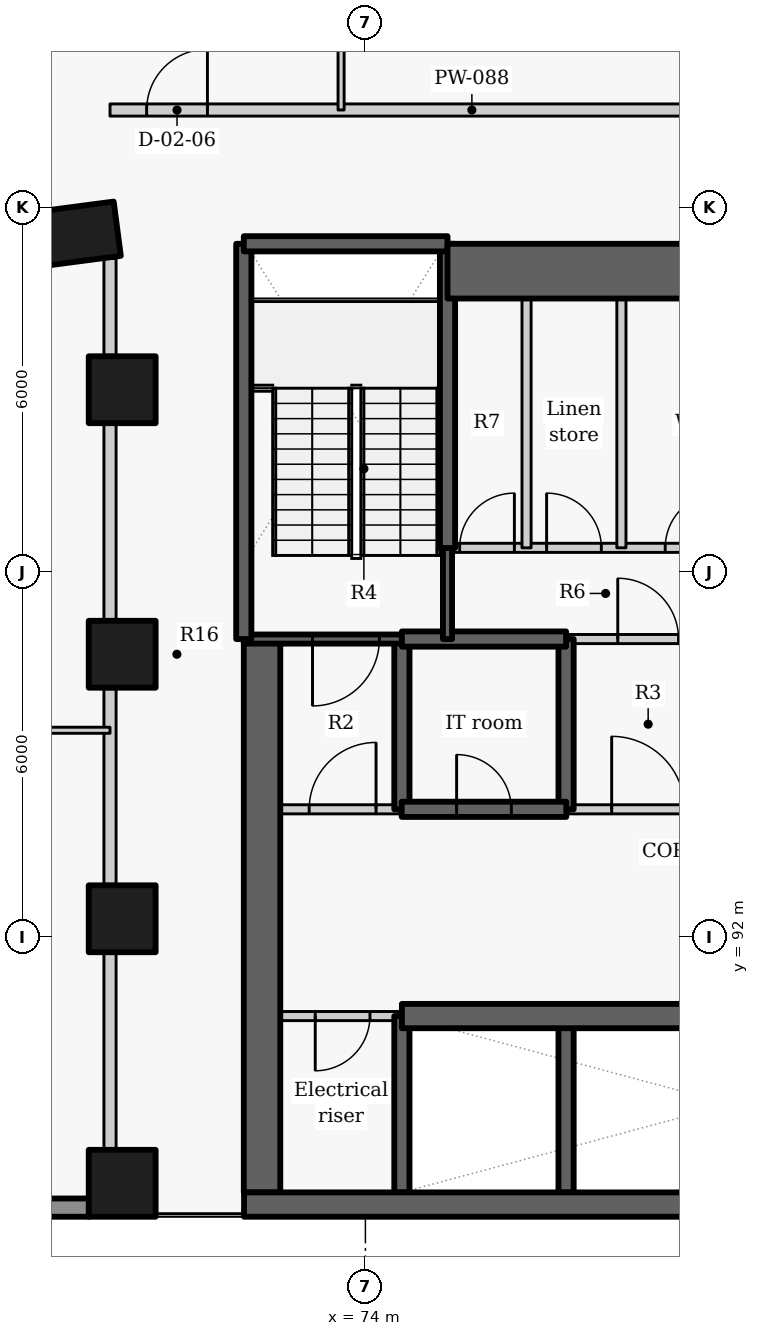
"""IFC4 building model, lengths in metres.
Left out: names, types, materials, properties, quantities, classifications, styles, units other than length and angle.
Written with IfcOpenShell. Run it as: python <this file> out.ifc"""

import sys

from ifc_helpers import new_model, si_unit, direction, frame, frame_2d, origin, origin_2d, place, context, subcontext, project, spatial, rectangle, extrude, element, fill, save


model = new_model("IFC4")
c1 = context("Model", 3, precision=1e-05, world=origin(), true_north=direction((0.0, 1.0)))
c2 = subcontext(c1, "Body", "Model", "MODEL_VIEW")
j1 = project(units=[si_unit("LENGTHUNIT", "METRE"), si_unit("PLANEANGLEUNIT", "RADIAN")], contexts=[c1])
p1 = place(None, origin())
s1 = spatial("IfcSite", under=j1, at=p1, CompositionType="ELEMENT")
p2 = place(p1, origin())
s2 = spatial("IfcBuilding", under=s1, at=p2, CompositionType="ELEMENT")
p3 = place(p2, frame((0.0, 0.0, 24.0)))
s3 = spatial("IfcBuildingStorey", under=s2, at=p3, CompositionType="ELEMENT", Elevation=24.0)
p4 = place(p3, frame((69.175, 103.55, 0.0), z_axis=(0.0, 0.0, 1.0), x_axis=(-0.991442583111, -0.130543496177, 0.0)))
e1 = element("IfcColumn", 1, at=p4, inside=s3, PredefinedType="COLUMN", context=c2, shape_type="SweptSolid", body=[
    extrude(rectangle(XDim=1.5, YDim=0.9, at=origin_2d()), origin(), (0.0, 0.0, 1.0), 4.2),
])
for number, where, z_axis, x_axis in (
    (2, (70.0, 101.0, 0.0), (0.0, 0.0, 1.0), (0.0, -1.0, 0.0)),
    (3, (70.0, 96.65, 0.0), (0.0, 0.0, 1.0), (0.0, -1.0, 0.0)),
    (4, (70.0, 92.3, 0.0), (0.0, 0.0, 1.0), (0.0, -1.0, 0.0)),
    (5, (70.0, 87.95, 0.0), (0.0, 0.0, 1.0), (0.0, -1.0, 0.0)),
):
    element("IfcColumn", number, at=place(p3, frame(where, z_axis=z_axis, x_axis=x_axis)), inside=s3, PredefinedType="COLUMN", context=c2, shape_type="SweptSolid", body=[
        extrude(rectangle(XDim=1.1, YDim=1.1, at=origin_2d()), origin(), (0.0, 0.0, 1.0), 4.2),
    ])
p5 = place(p3, frame((63.438, 87.55, 0.0), z_axis=(0.0, 0.0, 1.0), x_axis=(1.0, 0.0, 0.0)))
e6 = element("IfcWall", 6, at=p5, inside=s3, PredefinedType="SOLIDWALL", context=c2, shape_type="SweptSolid", body=[
    extrude(rectangle(XDim=6.016, YDim=0.3, at=frame_2d((3.008, 0.0))), origin(), (0.0, 0.0, 1.0), 3.325),
])
p6 = place(p5, frame((1.958, 0.0, 0.9)))
e7 = element("IfcOpeningElement", 7, at=p6, cuts=e6, PredefinedType="OPENING", context=c2, shape_type="SweptSolid", body=[
    extrude(rectangle(XDim=2.1, YDim=2.05, at=frame_2d((1.05, 1.025))), frame((0.0, 0.16, 0.0), z_axis=(0.0, -1.0, 0.0), x_axis=(1.0, 0.0, 0.0)), (0.0, 0.0, 1.0), 0.32),
])
p7 = place(p3, frame((74.6, 87.8, -0.3), z_axis=(0.0, 0.0, 1.0), x_axis=(0.0, 1.0, 0.0)))
e8 = element("IfcWall", 8, at=p7, inside=s3, PredefinedType="SHEAR", context=c2, shape_type="SweptSolid", body=[
    extrude(rectangle(XDim=2.9, YDim=0.25, at=frame_2d((1.45, 0.0))), origin(), (0.0, 0.0, 1.0), 4.225),
])
p8 = place(p3, frame((74.6, 94.1, -0.3), z_axis=(0.0, 0.0, 1.0), x_axis=(0.0, 1.0, 0.0)))
e9 = element("IfcWall", 9, at=p8, inside=s3, PredefinedType="SHEAR", context=c2, shape_type="SweptSolid", body=[
    extrude(rectangle(XDim=2.8, YDim=0.25, at=frame_2d((1.4, 0.0))), origin(), (0.0, 0.0, 1.0), 4.225),
])
p9 = place(p3, frame((74.6, 90.7, 0.0), z_axis=(0.0, 0.0, 1.0), x_axis=(-1.0, 0.0, 0.0)))
e10 = element("IfcWall", 10, at=p9, inside=s3, PredefinedType="PARTITIONING", context=c2, shape_type="SweptSolid", body=[
    extrude(rectangle(XDim=2.6, YDim=0.15, at=frame_2d((1.3, 0.0))), origin(), (0.0, 0.0, 1.0), 3.925),
])
p10 = place(p9, frame((0.525, 0.0, 0.0)))
e11 = element("IfcOpeningElement", 11, at=p10, cuts=e10, PredefinedType="OPENING", context=c2, shape_type="SweptSolid", body=[
    extrude(rectangle(XDim=0.9, YDim=2.1, at=frame_2d((0.45, 1.05))), frame((0.0, 0.085, 0.0), z_axis=(0.0, -1.0, 0.0), x_axis=(1.0, 0.0, 0.0)), (0.0, 0.0, 1.0), 0.17),
])
p11 = place(p3, frame((72.3, 87.8, -0.3), z_axis=(0.0, 0.0, 1.0), x_axis=(0.0, 1.0, 0.0)))
e12 = element("IfcWall", 12, at=p11, inside=s3, PredefinedType="SHEAR", context=c2, shape_type="SweptSolid", body=[
    extrude(rectangle(XDim=9.1, YDim=0.6, at=frame_2d((4.55, 0.0))), origin(), (0.0, 0.0, 1.0), 4.225),
])
p12 = place(p3, frame((77.3, 87.8, -0.3), z_axis=(0.0, 0.0, 1.0), x_axis=(0.0, 1.0, 0.0)))
e13 = element("IfcWall", 13, at=p12, inside=s3, PredefinedType="SHEAR", context=c2, shape_type="SweptSolid", body=[
    extrude(rectangle(XDim=2.9, YDim=0.25, at=frame_2d((1.45, 0.0))), origin(), (0.0, 0.0, 1.0), 4.225),
])
p13 = place(p3, frame((77.3, 94.1, -0.3), z_axis=(0.0, 0.0, 1.0), x_axis=(0.0, 1.0, 0.0)))
e14 = element("IfcWall", 14, at=p13, inside=s3, PredefinedType="SHEAR", context=c2, shape_type="SweptSolid", body=[
    extrude(rectangle(XDim=2.8, YDim=0.25, at=frame_2d((1.4, 0.0))), origin(), (0.0, 0.0, 1.0), 4.225),
])
p14 = place(p3, frame((74.6, 90.7, -0.3), z_axis=(0.0, 0.0, 1.0), x_axis=(1.0, 0.0, 0.0)))
e15 = element("IfcWall", 15, at=p14, inside=s3, PredefinedType="SHEAR", context=c2, shape_type="SweptSolid", body=[
    extrude(rectangle(XDim=10.8, YDim=0.4, at=frame_2d((5.4, 0.0))), origin(), (0.0, 0.0, 1.0), 4.225),
])
p15 = place(p3, frame((72.0, 94.1, 0.0), z_axis=(0.0, 0.0, 1.0), x_axis=(1.0, 0.0, 0.0)))
e16 = element("IfcWall", 16, at=p15, inside=s3, PredefinedType="PARTITIONING", context=c2, shape_type="SweptSolid", body=[
    extrude(rectangle(XDim=2.603, YDim=0.15, at=frame_2d((1.302, 0.0))), origin(), (0.0, 0.0, 1.0), 3.925),
])
p16 = place(p15, frame((1.075, 0.0, 0.0)))
e17 = element("IfcOpeningElement", 17, at=p16, cuts=e16, PredefinedType="OPENING", context=c2, shape_type="SweptSolid", body=[
    extrude(rectangle(XDim=1.1, YDim=2.1, at=frame_2d((0.55, 1.05))), frame((0.0, 0.085, 0.0), z_axis=(0.0, -1.0, 0.0), x_axis=(1.0, 0.0, 0.0)), (0.0, 0.0, 1.0), 0.17),
])
p17 = place(p3, frame((77.297, 94.1, 0.0), z_axis=(0.0, 0.0, 1.0), x_axis=(1.0, 0.0, 0.0)))
e18 = element("IfcWall", 18, at=p17, inside=s3, PredefinedType="PARTITIONING", context=c2, shape_type="SweptSolid", body=[
    extrude(rectangle(XDim=2.706, YDim=0.15, at=frame_2d((1.353, 0.0))), origin(), (0.0, 0.0, 1.0), 3.925),
])
p18 = place(p17, frame((0.753, 0.0, 0.0)))
e19 = element("IfcOpeningElement", 19, at=p18, cuts=e18, PredefinedType="OPENING", context=c2, shape_type="SweptSolid", body=[
    extrude(rectangle(XDim=1.2, YDim=2.1, at=frame_2d((0.6, 1.05))), frame((0.0, 0.085, 0.0), z_axis=(0.0, -1.0, 0.0), x_axis=(1.0, 0.0, 0.0)), (0.0, 0.0, 1.0), 0.17),
])
p19 = place(p3, frame((74.597, 94.1, -0.3), z_axis=(0.0, 0.0, 1.0), x_axis=(1.0, 0.0, 0.0)))
e20 = element("IfcWall", 20, at=p19, inside=s3, PredefinedType="SHEAR", context=c2, shape_type="SweptSolid", body=[
    extrude(rectangle(XDim=2.706, YDim=0.25, at=frame_2d((1.353, 0.0))), origin(), (0.0, 0.0, 1.0), 4.225),
])
p20 = place(p19, frame((0.903, 0.0, 0.3)))
e21 = element("IfcOpeningElement", 21, at=p20, cuts=e20, PredefinedType="OPENING", context=c2, shape_type="SweptSolid", body=[
    extrude(rectangle(XDim=0.9, YDim=2.1, at=frame_2d((0.45, 1.05))), frame((0.0, 0.135, 0.0), z_axis=(0.0, -1.0, 0.0), x_axis=(1.0, 0.0, 0.0)), (0.0, 0.0, 1.0), 0.27),
])
p21 = place(p3, frame((74.6, 96.9, -0.3), z_axis=(0.0, 0.0, 1.0), x_axis=(-1.0, 0.0, 0.0)))
e22 = element("IfcWall", 22, at=p21, inside=s3, PredefinedType="SHEAR", context=c2, shape_type="SweptSolid", body=[
    extrude(rectangle(XDim=2.6, YDim=0.15, at=frame_2d((1.3, 0.0))), origin(), (0.0, 0.0, 1.0), 4.225),
])
p22 = place(p21, frame((0.37, 0.0, 0.3)))
e23 = element("IfcOpeningElement", 23, at=p22, cuts=e22, PredefinedType="OPENING", context=c2, shape_type="SweptSolid", body=[
    extrude(rectangle(XDim=1.1, YDim=2.1, at=frame_2d((0.55, 1.05))), frame((0.0, 0.085, 0.0), z_axis=(0.0, -1.0, 0.0), x_axis=(1.0, 0.0, 0.0)), (0.0, 0.0, 1.0), 0.17),
])
p23 = place(p3, frame((74.6, 96.9, -0.3), z_axis=(0.0, 0.0, 1.0), x_axis=(1.0, 0.0, 0.0)))
e24 = element("IfcWall", 24, at=p23, inside=s3, PredefinedType="SHEAR", context=c2, shape_type="SweptSolid", body=[
    extrude(rectangle(XDim=2.7, YDim=0.25, at=frame_2d((1.35, 0.0))), origin(), (0.0, 0.0, 1.0), 4.225),
])
p24 = place(p3, frame((77.3, 96.9, 0.0), z_axis=(0.0, 0.0, 1.0), x_axis=(1.0, 0.0, 0.0)))
e25 = element("IfcWall", 25, at=p24, inside=s3, PredefinedType="PARTITIONING", context=c2, shape_type="SweptSolid", body=[
    extrude(rectangle(XDim=2.7, YDim=0.15, at=frame_2d((1.35, 0.0))), origin(), (0.0, 0.0, 1.0), 3.925),
])
p25 = place(p24, frame((0.85, 0.0, 0.0)))
e26 = element("IfcOpeningElement", 26, at=p25, cuts=e25, PredefinedType="OPENING", context=c2, shape_type="SweptSolid", body=[
    extrude(rectangle(XDim=1.0, YDim=2.1, at=frame_2d((0.5, 1.05))), frame((0.0, 0.085, 0.0), z_axis=(0.0, -1.0, 0.0), x_axis=(1.0, 0.0, 0.0)), (0.0, 0.0, 1.0), 0.17),
])
p26 = place(p3, frame((75.35, 96.9, -0.3), z_axis=(0.0, 0.0, 1.0), x_axis=(0.0, 1.0, 0.0)))
e27 = element("IfcWall", 27, at=p26, inside=s3, PredefinedType="SHEAR", context=c2, shape_type="SweptSolid", body=[
    extrude(rectangle(XDim=1.503, YDim=0.15, at=frame_2d((0.751, 0.0))), origin(), (0.0, 0.0, 1.0), 4.225),
])
p27 = place(p3, frame((75.35, 98.397, -0.3), z_axis=(0.0, 0.0, 1.0), x_axis=(0.0, 1.0, 0.0)))
e28 = element("IfcWall", 28, at=p27, inside=s3, PredefinedType="SHEAR", context=c2, shape_type="SweptSolid", body=[
    extrude(rectangle(XDim=5.003, YDim=0.25, at=frame_2d((2.501, 0.0))), origin(), (0.0, 0.0, 1.0), 4.225),
])
p28 = place(p3, frame((72.0, 96.9, -0.3), z_axis=(0.0, 0.0, 1.0), x_axis=(0.0, 1.0, 0.0)))
e29 = element("IfcWall", 29, at=p28, inside=s3, PredefinedType="SHEAR", context=c2, shape_type="SweptSolid", body=[
    extrude(rectangle(XDim=6.5, YDim=0.25, at=frame_2d((3.25, 0.0))), origin(), (0.0, 0.0, 1.0), 4.225),
])
p29 = place(p3, frame((72.0, 103.4, -0.3), z_axis=(0.0, 0.0, 1.0), x_axis=(1.0, 0.0, 0.0)))
e30 = element("IfcWall", 30, at=p29, inside=s3, PredefinedType="SHEAR", context=c2, shape_type="SweptSolid", body=[
    extrude(rectangle(XDim=3.35, YDim=0.25, at=frame_2d((1.675, 0.0))), origin(), (0.0, 0.0, 1.0), 4.225),
])
p30 = place(p3, frame((75.35, 102.95, -0.3), z_axis=(0.0, 0.0, 1.0), x_axis=(1.0, 0.0, 0.0)))
e31 = element("IfcWall", 31, at=p30, inside=s3, PredefinedType="SHEAR", context=c2, shape_type="SweptSolid", body=[
    extrude(rectangle(XDim=5.2, YDim=0.9, at=frame_2d((2.6, 0.0))), origin(), (0.0, 0.0, 1.0), 4.225),
])
p31 = place(p3, frame((75.35, 98.4, 0.0), z_axis=(0.0, 0.0, 1.0), x_axis=(1.0, 0.0, 0.0)))
e32 = element("IfcWall", 32, at=p31, inside=s3, PredefinedType="PARTITIONING", context=c2, shape_type="SweptSolid", body=[
    extrude(rectangle(XDim=5.2, YDim=0.15, at=frame_2d((2.6, 0.0))), origin(), (0.0, 0.0, 1.0), 3.925),
])
p32 = place(p31, frame((0.2, 0.0, 0.0)))
e33 = element("IfcOpeningElement", 33, at=p32, cuts=e32, PredefinedType="OPENING", context=c2, shape_type="SweptSolid", body=[
    extrude(rectangle(XDim=0.9, YDim=2.1, at=frame_2d((0.45, 1.05))), frame((0.0, 0.085, 0.0), z_axis=(0.0, -1.0, 0.0), x_axis=(1.0, 0.0, 0.0)), (0.0, 0.0, 1.0), 0.17),
])
p33 = place(p31, frame((1.63, 0.0, 0.0)))
e34 = element("IfcOpeningElement", 34, at=p33, cuts=e32, PredefinedType="OPENING", context=c2, shape_type="SweptSolid", body=[
    extrude(rectangle(XDim=0.9, YDim=2.1, at=frame_2d((0.45, 1.05))), frame((0.0, 0.085, 0.0), z_axis=(0.0, -1.0, 0.0), x_axis=(1.0, 0.0, 0.0)), (0.0, 0.0, 1.0), 0.17),
])
p34 = place(p31, frame((3.58, 0.0, 0.0)))
e35 = element("IfcOpeningElement", 35, at=p34, cuts=e32, PredefinedType="OPENING", context=c2, shape_type="SweptSolid", body=[
    extrude(rectangle(XDim=0.9, YDim=2.1, at=frame_2d((0.45, 1.05))), frame((0.0, 0.085, 0.0), z_axis=(0.0, -1.0, 0.0), x_axis=(1.0, 0.0, 0.0)), (0.0, 0.0, 1.0), 0.17),
])
for number, where, z_axis, x_axis in (
    (36, (76.65, 98.4, 0.0), (0.0, 0.0, 1.0), (0.0, 1.0, 0.0)),
    (37, (78.21, 98.4, 0.0), (0.0, 0.0, 1.0), (0.0, 1.0, 0.0)),
):
    element("IfcWall", number, at=place(p3, frame(where, z_axis=z_axis, x_axis=x_axis)), inside=s3, PredefinedType="PARTITIONING", context=c2, shape_type="SweptSolid", body=[
        extrude(rectangle(XDim=5.0, YDim=0.15, at=frame_2d((2.5, 0.0))), origin(), (0.0, 0.0, 1.0), 3.925),
    ])
p35 = place(p3, frame((69.8, 105.6, 0.0), z_axis=(0.0, 0.0, 1.0), x_axis=(1.0, 0.0, 0.0)))
e38 = element("IfcWall", 38, at=p35, inside=s3, PredefinedType="PARTITIONING", context=c2, shape_type="SweptSolid", body=[
    extrude(rectangle(XDim=20.4, YDim=0.2, at=frame_2d((10.2, 0.0))), origin(), (0.0, 0.0, 1.0), 3.925),
])
p36 = place(p35, frame((0.602, 0.0, 0.0)))
e39 = element("IfcOpeningElement", 39, at=p36, cuts=e38, PredefinedType="OPENING", context=c2, shape_type="SweptSolid", body=[
    extrude(rectangle(XDim=1.0, YDim=2.1, at=frame_2d((0.5, 1.05))), frame((0.0, 0.11, 0.0), z_axis=(0.0, -1.0, 0.0), x_axis=(1.0, 0.0, 0.0)), (0.0, 0.0, 1.0), 0.22),
])
p37 = place(p35, frame((18.8, 0.0, 0.0)))
e40 = element("IfcOpeningElement", 40, at=p37, cuts=e38, PredefinedType="OPENING", context=c2, shape_type="SweptSolid", body=[
    extrude(rectangle(XDim=1.0, YDim=2.1, at=frame_2d((0.5, 1.05))), frame((0.0, 0.11, 0.0), z_axis=(0.0, -1.0, 0.0), x_axis=(1.0, 0.0, 0.0)), (0.0, 0.0, 1.0), 0.22),
])
p38 = place(p35, frame((10.3, 0.0, 0.0)))
e41 = element("IfcOpeningElement", 41, at=p38, cuts=e38, PredefinedType="OPENING", context=c2, shape_type="SweptSolid", body=[
    extrude(rectangle(XDim=1.0, YDim=2.1, at=frame_2d((0.5, 1.05))), frame((0.0, 0.11, 0.0), z_axis=(0.0, -1.0, 0.0), x_axis=(1.0, 0.0, 0.0)), (0.0, 0.0, 1.0), 0.22),
])
p39 = place(p3, frame((69.8, 88.517, 0.0), z_axis=(0.0, 0.0, 1.0), x_axis=(0.0, 1.0, 0.0)))
e42 = element("IfcWall", 42, at=p39, inside=s3, PredefinedType="PARTITIONING", context=c2, shape_type="SweptSolid", body=[
    extrude(rectangle(XDim=3.216, YDim=0.2, at=frame_2d((1.608, 0.0))), origin(), (0.0, 0.0, 1.0), 3.405),
])
for number, where, z_axis, x_axis in (
    (43, (69.8, 92.867, 0.0), (0.0, 0.0, 1.0), (0.0, 1.0, 0.0)),
    (44, (69.8, 97.217, 0.0), (0.0, 0.0, 1.0), (0.0, 1.0, 0.0)),
):
    element("IfcWall", number, at=place(p3, frame(where, z_axis=z_axis, x_axis=x_axis)), inside=s3, PredefinedType="PARTITIONING", context=c2, shape_type="SweptSolid", body=[
        extrude(rectangle(XDim=3.216, YDim=0.2, at=frame_2d((1.608, 0.0))), origin(), (0.0, 0.0, 1.0), 3.405),
    ])
p40 = place(p3, frame((69.8, 101.567, 0.0), z_axis=(0.0, 0.0, 1.0), x_axis=(0.0, 1.0, 0.0)))
e45 = element("IfcWall", 45, at=p40, inside=s3, PredefinedType="PARTITIONING", context=c2, shape_type="SweptSolid", body=[
    extrude(rectangle(XDim=1.594, YDim=0.2, at=frame_2d((0.797, 0.0))), origin(), (0.0, 0.0, 1.0), 3.925),
])
p41 = place(p3, frame((62.434, 95.4, 0.0), z_axis=(0.0, 0.0, 1.0), x_axis=(1.0, 0.0, 0.0)))
e46 = element("IfcWall", 46, at=p41, inside=s3, PredefinedType="PARTITIONING", context=c2, shape_type="SweptSolid", body=[
    extrude(rectangle(XDim=7.366, YDim=0.1, at=frame_2d((3.683, 0.0))), origin(), (0.0, 0.0, 1.0), 3.925),
])
p42 = place(p3, frame((73.6, 105.6, 0.0), z_axis=(0.0, 0.0, 1.0), x_axis=(0.0, 1.0, 0.0)))
e47 = element("IfcWall", 47, at=p42, inside=s3, PredefinedType="PARTITIONING", context=c2, shape_type="SweptSolid", body=[
    extrude(rectangle(XDim=7.1, YDim=0.1, at=frame_2d((3.55, 0.0))), origin(), (0.0, 0.0, 1.0), 3.925),
])
p43 = place(p3, frame((72.004, 87.6, -0.3), z_axis=(0.0, 0.0, 1.0), x_axis=(1.0, 0.0, 0.0)))
e48 = element("IfcWall", 48, at=p43, inside=s3, PredefinedType="SHEAR", context=c2, shape_type="SweptSolid", body=[
    extrude(rectangle(XDim=15.992, YDim=0.4, at=frame_2d((7.996, 0.0))), origin(), (0.0, 0.0, 1.0), 4.225),
])
p44 = place(p10, origin())
e49 = element("IfcDoor", 49, at=p44, inside=s3, OperationType="SINGLE_SWING_RIGHT", PredefinedType="DOOR", context=c2, shape_type="SweptSolid", body=[
    extrude(rectangle(XDim=0.9, YDim=2.1, at=frame_2d((0.45, 1.05))), frame((0.0, 0.025, 0.0), z_axis=(0.0, -1.0, 0.0), x_axis=(1.0, 0.0, 0.0)), (0.0, 0.0, 1.0), 0.05),
])
fill(e11, e49)
p45 = place(p16, origin())
e50 = element("IfcDoor", 50, at=p45, inside=s3, OperationType="SINGLE_SWING_RIGHT", PredefinedType="DOOR", context=c2, shape_type="SweptSolid", body=[
    extrude(rectangle(XDim=1.1, YDim=2.1, at=frame_2d((0.55, 1.05))), frame((0.0, 0.025, 0.0), z_axis=(0.0, -1.0, 0.0), x_axis=(1.0, 0.0, 0.0)), (0.0, 0.0, 1.0), 0.05),
])
fill(e17, e50)
p46 = place(p20, origin())
e51 = element("IfcDoor", 51, at=p46, inside=s3, OperationType="SINGLE_SWING_LEFT", PredefinedType="DOOR", context=c2, shape_type="SweptSolid", body=[
    extrude(rectangle(XDim=0.9, YDim=2.1, at=frame_2d((0.45, 1.05))), frame((0.0, 0.025, 0.0), z_axis=(0.0, -1.0, 0.0), x_axis=(1.0, 0.0, 0.0)), (0.0, 0.0, 1.0), 0.05),
])
fill(e21, e51)
p47 = place(p18, origin())
e52 = element("IfcDoor", 52, at=p47, inside=s3, OperationType="DOUBLE_DOOR_SINGLE_SWING", PredefinedType="DOOR", context=c2, shape_type="SweptSolid", body=[
    extrude(rectangle(XDim=1.2, YDim=2.1, at=frame_2d((0.6, 1.05))), frame((0.0, 0.025, 0.0), z_axis=(0.0, -1.0, 0.0), x_axis=(1.0, 0.0, 0.0)), (0.0, 0.0, 1.0), 0.05),
])
fill(e19, e52)
p48 = place(p25, origin())
e53 = element("IfcDoor", 53, at=p48, inside=s3, OperationType="SINGLE_SWING_LEFT", PredefinedType="DOOR", context=c2, shape_type="SweptSolid", body=[
    extrude(rectangle(XDim=1.0, YDim=2.1, at=frame_2d((0.5, 1.05))), frame((0.0, 0.025, 0.0), z_axis=(0.0, -1.0, 0.0), x_axis=(1.0, 0.0, 0.0)), (0.0, 0.0, 1.0), 0.05),
])
fill(e26, e53)
p49 = place(p32, origin())
e54 = element("IfcDoor", 54, at=p49, inside=s3, OperationType="SINGLE_SWING_RIGHT", PredefinedType="DOOR", context=c2, shape_type="SweptSolid", body=[
    extrude(rectangle(XDim=0.9, YDim=2.1, at=frame_2d((0.45, 1.05))), frame((0.0, 0.025, 0.0), z_axis=(0.0, -1.0, 0.0), x_axis=(1.0, 0.0, 0.0)), (0.0, 0.0, 1.0), 0.05),
])
fill(e33, e54)
p50 = place(p33, origin())
e55 = element("IfcDoor", 55, at=p50, inside=s3, OperationType="SINGLE_SWING_LEFT", PredefinedType="DOOR", context=c2, shape_type="SweptSolid", body=[
    extrude(rectangle(XDim=0.9, YDim=2.1, at=frame_2d((0.45, 1.05))), frame((0.0, 0.025, 0.0), z_axis=(0.0, -1.0, 0.0), x_axis=(1.0, 0.0, 0.0)), (0.0, 0.0, 1.0), 0.05),
])
fill(e34, e55)
p51 = place(p34, origin())
e56 = element("IfcDoor", 56, at=p51, inside=s3, OperationType="SINGLE_SWING_RIGHT", PredefinedType="DOOR", context=c2, shape_type="SweptSolid", body=[
    extrude(rectangle(XDim=0.9, YDim=2.1, at=frame_2d((0.45, 1.05))), frame((0.0, 0.025, 0.0), z_axis=(0.0, -1.0, 0.0), x_axis=(1.0, 0.0, 0.0)), (0.0, 0.0, 1.0), 0.05),
])
fill(e35, e56)
p52 = place(p22, origin())
e57 = element("IfcDoor", 57, at=p52, inside=s3, OperationType="SINGLE_SWING_RIGHT", PredefinedType="DOOR", context=c2, shape_type="SweptSolid", body=[
    extrude(rectangle(XDim=1.1, YDim=2.1, at=frame_2d((0.55, 1.05))), frame((0.0, 0.025, 0.0), z_axis=(0.0, -1.0, 0.0), x_axis=(1.0, 0.0, 0.0)), (0.0, 0.0, 1.0), 0.05),
])
fill(e23, e57)
p53 = place(p36, origin())
e58 = element("IfcDoor", 58, at=p53, inside=s3, OperationType="SINGLE_SWING_RIGHT", PredefinedType="DOOR", context=c2, shape_type="SweptSolid", body=[
    extrude(rectangle(XDim=1.0, YDim=2.1, at=frame_2d((0.5, 1.05))), frame((0.0, 0.025, 0.0), z_axis=(0.0, -1.0, 0.0), x_axis=(1.0, 0.0, 0.0)), (0.0, 0.0, 1.0), 0.05),
])
fill(e39, e58)
save(model, sys.argv[1])
